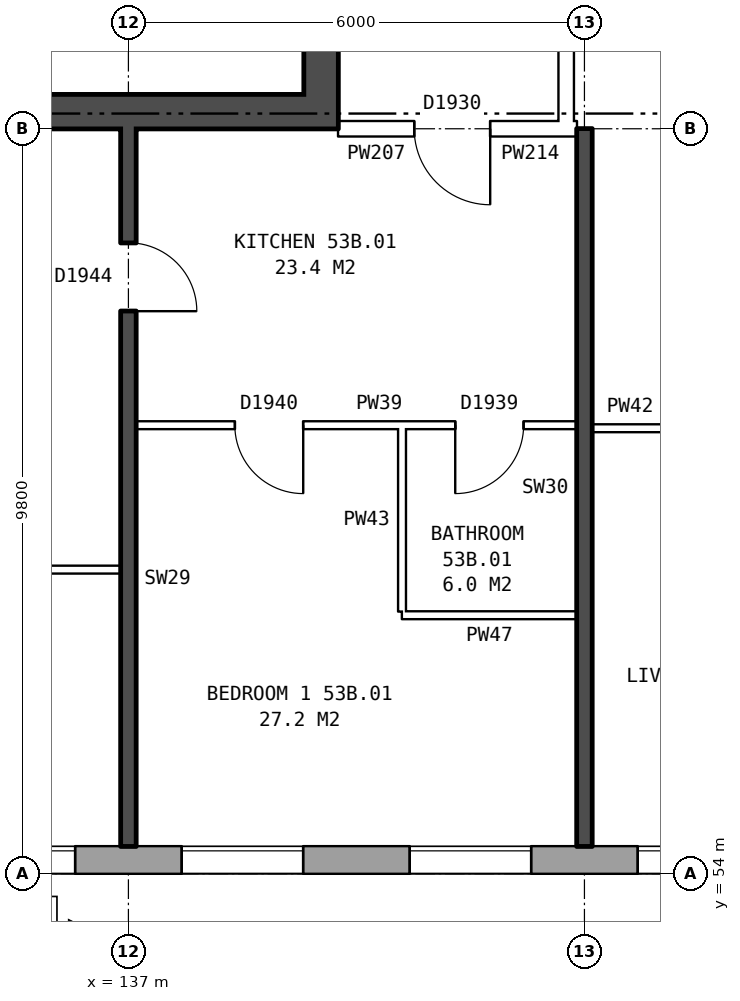
"""IFC4 building model, lengths in metres.
Left out: names, types, materials, properties, quantities, classifications, styles, units other than length and angle.
Written with IfcOpenShell. Run it as: python <this file> out.ifc"""

import sys

from ifc_helpers import new_model, si_unit, direction, frame, frame_2d, origin, place, context, subcontext, project, spatial, rectangle, extrude, element, fill, save


model = new_model("IFC4")
c1 = context("Model", 3, precision=1e-05, world=origin(), true_north=direction((0.0, 1.0)))
c2 = subcontext(c1, "Body", "Model", "MODEL_VIEW")
j1 = project(units=[si_unit("LENGTHUNIT", "METRE"), si_unit("PLANEANGLEUNIT", "RADIAN")], contexts=[c1])
p1 = place(None, origin())
s1 = spatial("IfcSite", under=j1, at=p1, CompositionType="ELEMENT")
p2 = place(p1, origin())
s2 = spatial("IfcBuilding", under=s1, at=p2, CompositionType="ELEMENT")
p3 = place(p2, frame((0.0, 0.0, 188.2)))
s3 = spatial("IfcBuildingStorey", under=s2, at=p3, CompositionType="ELEMENT", Elevation=188.2)
p4 = place(p3, frame((134.075, 54.18, 0.0), z_axis=(0.0, 0.0, 1.0), x_axis=(1.0, 0.0, 0.0)))
e1 = element("IfcWall", 1, at=p4, inside=s3, PredefinedType="STANDARD", context=c2, shape_type="SweptSolid", body=[
    extrude(rectangle(XDim=33.101, YDim=0.36, at=frame_2d((16.55, 0.0))), origin(), (0.0, 0.0, 1.0), 2.85),
])
p5 = place(p4, frame((0.625, 0.0, 0.8)))
e2 = element("IfcOpeningElement", 2, at=p5, cuts=e1, PredefinedType="OPENING", context=c2, shape_type="SweptSolid", body=[
    extrude(rectangle(XDim=1.6, YDim=1.8, at=frame_2d((0.8, 0.9))), frame((0.0, 0.19, 0.0), z_axis=(0.0, -1.0, 0.0), x_axis=(1.0, 0.0, 0.0)), (0.0, 0.0, 1.0), 0.38),
])
p6 = place(p4, frame((3.625, 0.0, 0.8)))
e3 = element("IfcOpeningElement", 3, at=p6, cuts=e1, PredefinedType="OPENING", context=c2, shape_type="SweptSolid", body=[
    extrude(rectangle(XDim=1.6, YDim=1.8, at=frame_2d((0.8, 0.9))), frame((0.0, 0.19, 0.0), z_axis=(0.0, -1.0, 0.0), x_axis=(1.0, 0.0, 0.0)), (0.0, 0.0, 1.0), 0.38),
])
p7 = place(p4, frame((6.625, 0.0, 0.8)))
e4 = element("IfcOpeningElement", 4, at=p7, cuts=e1, PredefinedType="OPENING", context=c2, shape_type="SweptSolid", body=[
    extrude(rectangle(XDim=1.6, YDim=1.8, at=frame_2d((0.8, 0.9))), frame((0.0, 0.19, 0.0), z_axis=(0.0, -1.0, 0.0), x_axis=(1.0, 0.0, 0.0)), (0.0, 0.0, 1.0), 0.38),
])
p8 = place(p4, frame((9.625, 0.0, 0.8)))
e5 = element("IfcOpeningElement", 5, at=p8, cuts=e1, PredefinedType="OPENING", context=c2, shape_type="SweptSolid", body=[
    extrude(rectangle(XDim=1.6, YDim=1.8, at=frame_2d((0.8, 0.9))), frame((0.0, 0.19, 0.0), z_axis=(0.0, -1.0, 0.0), x_axis=(1.0, 0.0, 0.0)), (0.0, 0.0, 1.0), 0.38),
])
p9 = place(p4, frame((12.975, 0.0, 0.15)))
e6 = element("IfcOpeningElement", 6, at=p9, cuts=e1, PredefinedType="OPENING", context=c2, shape_type="SweptSolid", body=[
    extrude(rectangle(XDim=0.6, YDim=0.9, at=frame_2d((0.3, 0.45))), frame((0.0, 0.19, 0.0), z_axis=(0.0, -1.0, 0.0), x_axis=(1.0, 0.0, 0.0)), (0.0, 0.0, 1.0), 0.38),
])
p10 = place(p4, frame((15.625, 0.0, 0.8)))
e7 = element("IfcOpeningElement", 7, at=p10, cuts=e1, PredefinedType="OPENING", context=c2, shape_type="SweptSolid", body=[
    extrude(rectangle(XDim=1.6, YDim=1.8, at=frame_2d((0.8, 0.9))), frame((0.0, 0.19, 0.0), z_axis=(0.0, -1.0, 0.0), x_axis=(1.0, 0.0, 0.0)), (0.0, 0.0, 1.0), 0.38),
])
p11 = place(p4, frame((18.075, 0.0, 0.45)))
e8 = element("IfcOpeningElement", 8, at=p11, cuts=e1, PredefinedType="OPENING", context=c2, shape_type="SweptSolid", body=[
    extrude(rectangle(XDim=1.0, YDim=1.8, at=frame_2d((0.5, 0.9))), frame((0.0, 0.19, 0.0), z_axis=(0.0, -1.0, 0.0), x_axis=(1.0, 0.0, 0.0)), (0.0, 0.0, 1.0), 0.38),
])
p12 = place(p4, frame((21.625, 0.0, 0.8)))
e9 = element("IfcOpeningElement", 9, at=p12, cuts=e1, PredefinedType="OPENING", context=c2, shape_type="SweptSolid", body=[
    extrude(rectangle(XDim=1.6, YDim=1.8, at=frame_2d((0.8, 0.9))), frame((0.0, 0.19, 0.0), z_axis=(0.0, -1.0, 0.0), x_axis=(1.0, 0.0, 0.0)), (0.0, 0.0, 1.0), 0.38),
])
p13 = place(p4, frame((24.625, 0.0, 0.8)))
e10 = element("IfcOpeningElement", 10, at=p13, cuts=e1, PredefinedType="OPENING", context=c2, shape_type="SweptSolid", body=[
    extrude(rectangle(XDim=1.6, YDim=1.8, at=frame_2d((0.8, 0.9))), frame((0.0, 0.19, 0.0), z_axis=(0.0, -1.0, 0.0), x_axis=(1.0, 0.0, 0.0)), (0.0, 0.0, 1.0), 0.38),
])
p14 = place(p4, frame((27.625, 0.0, 0.8)))
e11 = element("IfcOpeningElement", 11, at=p14, cuts=e1, PredefinedType="OPENING", context=c2, shape_type="SweptSolid", body=[
    extrude(rectangle(XDim=1.6, YDim=1.8, at=frame_2d((0.8, 0.9))), frame((0.0, 0.19, 0.0), z_axis=(0.0, -1.0, 0.0), x_axis=(1.0, 0.0, 0.0)), (0.0, 0.0, 1.0), 0.38),
])
p15 = place(p4, frame((30.625, 0.0, 0.8)))
e12 = element("IfcOpeningElement", 12, at=p15, cuts=e1, PredefinedType="OPENING", context=c2, shape_type="SweptSolid", body=[
    extrude(rectangle(XDim=1.6, YDim=1.8, at=frame_2d((0.8, 0.9))), frame((0.0, 0.19, 0.0), z_axis=(0.0, -1.0, 0.0), x_axis=(1.0, 0.0, 0.0)), (0.0, 0.0, 1.0), 0.38),
])
p16 = place(p4, frame((13.875, 0.0, 0.25)))
e13 = element("IfcOpeningElement", 13, at=p16, cuts=e1, PredefinedType="OPENING", context=c2, shape_type="SweptSolid", body=[
    extrude(rectangle(XDim=0.8, YDim=1.8, at=frame_2d((0.4, 0.9))), frame((0.0, 0.19, 0.0), z_axis=(0.0, -1.0, 0.0), x_axis=(1.0, 0.0, 0.0)), (0.0, 0.0, 1.0), 0.38),
])
p17 = place(p4, frame((19.375, 0.0, 0.35)))
e14 = element("IfcOpeningElement", 14, at=p17, cuts=e1, PredefinedType="OPENING", context=c2, shape_type="SweptSolid", body=[
    extrude(rectangle(XDim=0.6, YDim=0.9, at=frame_2d((0.3, 0.45))), frame((0.0, 0.19, 0.0), z_axis=(0.0, -1.0, 0.0), x_axis=(1.0, 0.0, 0.0)), (0.0, 0.0, 1.0), 0.38),
])
p18 = place(p3, frame((139.535, 63.8, 0.0), z_axis=(0.0, 0.0, 1.0), x_axis=(0.0, 1.0, 0.0)))
e15 = element("IfcWall", 15, at=p18, inside=s3, PredefinedType="SHEAR", context=c2, shape_type="SweptSolid", body=[
    extrude(rectangle(XDim=12.4, YDim=0.45, at=frame_2d((6.2, 0.0))), origin(), (0.0, 0.0, 1.0), 2.85),
])
p19 = place(p18, frame((1.325, 0.0, 0.0)))
e16 = element("IfcOpeningElement", 16, at=p19, cuts=e15, PredefinedType="OPENING", context=c2, shape_type="SweptSolid", body=[
    extrude(rectangle(XDim=1.1, YDim=2.1, at=frame_2d((0.55, 1.05))), frame((0.0, 0.235, 0.0), z_axis=(0.0, -1.0, 0.0), x_axis=(1.0, 0.0, 0.0)), (0.0, 0.0, 1.0), 0.47),
])
p20 = place(p18, frame((3.6, 0.0, 0.0)))
e17 = element("IfcOpeningElement", 17, at=p20, cuts=e15, PredefinedType="OPENING", context=c2, shape_type="SweptSolid", body=[
    extrude(rectangle(XDim=1.1, YDim=2.1, at=frame_2d((0.55, 1.05))), frame((0.0, 0.235, 0.0), z_axis=(0.0, -1.0, 0.0), x_axis=(1.0, 0.0, 0.0)), (0.0, 0.0, 1.0), 0.47),
])
p21 = place(p18, frame((5.8, 0.0, 0.0)))
e18 = element("IfcOpeningElement", 18, at=p21, cuts=e15, PredefinedType="OPENING", context=c2, shape_type="SweptSolid", body=[
    extrude(rectangle(XDim=1.1, YDim=2.1, at=frame_2d((0.55, 1.05))), frame((0.0, 0.235, 0.0), z_axis=(0.0, -1.0, 0.0), x_axis=(1.0, 0.0, 0.0)), (0.0, 0.0, 1.0), 0.47),
])
p22 = place(p18, frame((9.9, 0.0, 0.0)))
e19 = element("IfcOpeningElement", 19, at=p22, cuts=e15, PredefinedType="OPENING", context=c2, shape_type="SweptSolid", body=[
    extrude(rectangle(XDim=1.1, YDim=2.1, at=frame_2d((0.55, 1.05))), frame((0.0, 0.235, 0.0), z_axis=(0.0, -1.0, 0.0), x_axis=(1.0, 0.0, 0.0)), (0.0, 0.0, 1.0), 0.47),
])
p23 = place(p18, frame((8.125, 0.0, 0.0)))
e20 = element("IfcOpeningElement", 20, at=p23, cuts=e15, PredefinedType="OPENING", context=c2, shape_type="SweptSolid", body=[
    extrude(rectangle(XDim=0.85, YDim=2.1, at=frame_2d((0.425, 1.05))), frame((0.0, 0.235, 0.0), z_axis=(0.0, -1.0, 0.0), x_axis=(1.0, 0.0, 0.0)), (0.0, 0.0, 1.0), 0.47),
])
p24 = place(p3, frame((139.31, 64.025, 0.0), z_axis=(0.0, 0.0, 1.0), x_axis=(-1.0, 0.0, 0.0)))
e21 = element("IfcWall", 21, at=p24, inside=s3, PredefinedType="SHEAR", context=c2, shape_type="SweptSolid", body=[
    extrude(rectangle(XDim=7.5, YDim=0.45, at=frame_2d((3.75, 0.0))), origin(), (0.0, 0.0, 1.0), 2.85),
])
p25 = place(p3, frame((142.76, 63.9, 0.0), z_axis=(0.0, 0.0, 1.0), x_axis=(0.0, 1.0, 0.0)))
e22 = element("IfcWall", 22, at=p25, inside=s3, PredefinedType="PARTITIONING", context=c2, shape_type="SweptSolid", body=[
    extrude(rectangle(XDim=12.2, YDim=0.2, at=frame_2d((6.1, 0.0))), origin(), (0.0, 0.0, 1.0), 2.85),
])
p26 = place(p25, frame((5.1, 0.0, 0.0)))
e23 = element("IfcOpeningElement", 23, at=p26, cuts=e22, PredefinedType="OPENING", context=c2, shape_type="SweptSolid", body=[
    extrude(rectangle(XDim=2.0, YDim=2.1, at=frame_2d((1.0, 1.05))), frame((0.0, 0.11, 0.0), z_axis=(0.0, -1.0, 0.0), x_axis=(1.0, 0.0, 0.0)), (0.0, 0.0, 1.0), 0.22),
])
p27 = place(p3, frame((140.6, 57.4, 0.0), z_axis=(0.0, 0.0, 1.0), x_axis=(1.0, 0.0, 0.0)))
e24 = element("IfcWall", 24, at=p27, inside=s3, PredefinedType="PARTITIONING", context=c2, shape_type="SweptSolid", body=[
    extrude(rectangle(XDim=2.3, YDim=0.1, at=frame_2d((1.15, 0.0))), origin(), (0.0, 0.0, 1.0), 2.85),
])
p28 = place(p3, frame((131.36, 58.0, 0.0), z_axis=(0.0, 0.0, 1.0), x_axis=(1.0, 0.0, 0.0)))
e25 = element("IfcWall", 25, at=p28, inside=s3, PredefinedType="PARTITIONING", context=c2, shape_type="SweptSolid", body=[
    extrude(rectangle(XDim=5.54, YDim=0.1, at=frame_2d((2.77, 0.0))), origin(), (0.0, 0.0, 1.0), 2.85),
])
p29 = place(p28, frame((2.32, 0.0, 0.0)))
e26 = element("IfcOpeningElement", 26, at=p29, cuts=e25, PredefinedType="OPENING", context=c2, shape_type="SweptSolid", body=[
    extrude(rectangle(XDim=0.9, YDim=2.1, at=frame_2d((0.45, 1.05))), frame((0.0, 0.06, 0.0), z_axis=(0.0, -1.0, 0.0), x_axis=(1.0, 0.0, 0.0)), (0.0, 0.0, 1.0), 0.12),
])
p30 = place(p3, frame((143.1, 59.86, 0.0), z_axis=(0.0, 0.0, 1.0), x_axis=(1.0, 0.0, 0.0)))
e27 = element("IfcWall", 27, at=p30, inside=s3, PredefinedType="PARTITIONING", context=c2, shape_type="SweptSolid", body=[
    extrude(rectangle(XDim=2.9, YDim=0.1, at=frame_2d((1.45, 0.0))), origin(), (0.0, 0.0, 1.0), 2.85),
])
p31 = place(p30, frame((1.0, 0.0, 0.0)))
e28 = element("IfcOpeningElement", 28, at=p31, cuts=e27, PredefinedType="OPENING", context=c2, shape_type="SweptSolid", body=[
    extrude(rectangle(XDim=0.9, YDim=2.1, at=frame_2d((0.45, 1.05))), frame((0.0, 0.06, 0.0), z_axis=(0.0, -1.0, 0.0), x_axis=(1.0, 0.0, 0.0)), (0.0, 0.0, 1.0), 0.12),
])
p32 = place(p3, frame((137.1, 59.9, 0.0), z_axis=(0.0, 0.0, 1.0), x_axis=(1.0, 0.0, 0.0)))
e29 = element("IfcWall", 29, at=p32, inside=s3, PredefinedType="PARTITIONING", context=c2, shape_type="SweptSolid", body=[
    extrude(rectangle(XDim=5.8, YDim=0.1, at=frame_2d((2.9, 0.0))), origin(), (0.0, 0.0, 1.0), 2.85),
])
p33 = place(p32, frame((1.3, 0.0, 0.0)))
e30 = element("IfcOpeningElement", 30, at=p33, cuts=e29, PredefinedType="OPENING", context=c2, shape_type="SweptSolid", body=[
    extrude(rectangle(XDim=0.9, YDim=2.1, at=frame_2d((0.45, 1.05))), frame((0.0, 0.06, 0.0), z_axis=(0.0, -1.0, 0.0), x_axis=(1.0, 0.0, 0.0)), (0.0, 0.0, 1.0), 0.12),
])
p34 = place(p32, frame((4.2, 0.0, 0.0)))
e31 = element("IfcOpeningElement", 31, at=p34, cuts=e29, PredefinedType="OPENING", context=c2, shape_type="SweptSolid", body=[
    extrude(rectangle(XDim=0.9, YDim=2.1, at=frame_2d((0.45, 1.05))), frame((0.0, 0.06, 0.0), z_axis=(0.0, -1.0, 0.0), x_axis=(1.0, 0.0, 0.0)), (0.0, 0.0, 1.0), 0.12),
])
p35 = place(p3, frame((139.76, 63.8, 0.0), z_axis=(0.0, 0.0, 1.0), x_axis=(1.0, 0.0, 0.0)))
e32 = element("IfcWall", 32, at=p35, inside=s3, PredefinedType="PARTITIONING", context=c2, shape_type="SweptSolid", body=[
    extrude(rectangle(XDim=3.0, YDim=0.2, at=frame_2d((1.5, 0.0))), origin(), (0.0, 0.0, 1.0), 2.85),
])
p36 = place(p35, frame((1.0, 0.0, 0.0)))
e33 = element("IfcOpeningElement", 33, at=p36, cuts=e32, PredefinedType="OPENING", context=c2, shape_type="SweptSolid", body=[
    extrude(rectangle(XDim=1.0, YDim=2.1, at=frame_2d((0.5, 1.05))), frame((0.0, 0.11, 0.0), z_axis=(0.0, -1.0, 0.0), x_axis=(1.0, 0.0, 0.0)), (0.0, 0.0, 1.0), 0.22),
])
p37 = place(p3, frame((142.76, 63.8, 0.0), z_axis=(0.0, 0.0, 1.0), x_axis=(1.0, 0.0, 0.0)))
e34 = element("IfcWall", 34, at=p37, inside=s3, PredefinedType="PARTITIONING", context=c2, shape_type="SweptSolid", body=[
    extrude(rectangle(XDim=0.14, YDim=0.2, at=frame_2d((0.07, 0.0))), origin(), (0.0, 0.0, 1.0), 2.85),
])
p38 = place(p3, frame((137.0, 54.36, 0.0), z_axis=(0.0, 0.0, 1.0), x_axis=(0.0, 1.0, 0.0)))
e35 = element("IfcWall", 35, at=p38, inside=s3, PredefinedType="SOLIDWALL", context=c2, shape_type="SweptSolid", body=[
    extrude(rectangle(XDim=9.44, YDim=0.2, at=frame_2d((4.72, 0.0))), origin(), (0.0, 0.0, 1.0), 2.85),
])
p39 = place(p38, frame((7.04, 0.0, 0.0)))
e36 = element("IfcOpeningElement", 36, at=p39, cuts=e35, PredefinedType="OPENING", context=c2, shape_type="SweptSolid", body=[
    extrude(rectangle(XDim=0.9, YDim=2.1, at=frame_2d((0.45, 1.05))), frame((0.0, 0.11, 0.0), z_axis=(0.0, -1.0, 0.0), x_axis=(1.0, 0.0, 0.0)), (0.0, 0.0, 1.0), 0.22),
])
p40 = place(p3, frame((140.6, 57.45, 0.0), z_axis=(0.0, 0.0, 1.0), x_axis=(0.0, 1.0, 0.0)))
e37 = element("IfcWall", 37, at=p40, inside=s3, PredefinedType="PARTITIONING", context=c2, shape_type="SweptSolid", body=[
    extrude(rectangle(XDim=2.4, YDim=0.1, at=frame_2d((1.2, 0.0))), origin(), (0.0, 0.0, 1.0), 2.85),
])
p41 = place(p3, frame((143.0, 54.36, 0.0), z_axis=(0.0, 0.0, 1.0), x_axis=(0.0, 1.0, 0.0)))
e38 = element("IfcWall", 38, at=p41, inside=s3, PredefinedType="SOLIDWALL", context=c2, shape_type="SweptSolid", body=[
    extrude(rectangle(XDim=9.44, YDim=0.2, at=frame_2d((4.72, 0.0))), origin(), (0.0, 0.0, 1.0), 2.85),
])
p42 = place(p5, origin())
e39 = element("IfcWindow", 39, at=p42, inside=s3, PartitioningType="SINGLE_PANEL", PredefinedType="WINDOW", context=c2, shape_type="SweptSolid", body=[
    extrude(rectangle(XDim=1.6, YDim=1.8, at=frame_2d((0.8, 0.9))), frame((0.0, 0.15, 0.0), z_axis=(0.0, -1.0, 0.0), x_axis=(1.0, 0.0, 0.0)), (0.0, 0.0, 1.0), 0.06),
])
fill(e2, e39)
p43 = place(p6, origin())
e40 = element("IfcWindow", 40, at=p43, inside=s3, PartitioningType="SINGLE_PANEL", PredefinedType="WINDOW", context=c2, shape_type="SweptSolid", body=[
    extrude(rectangle(XDim=1.6, YDim=1.8, at=frame_2d((0.8, 0.9))), frame((0.0, 0.15, 0.0), z_axis=(0.0, -1.0, 0.0), x_axis=(1.0, 0.0, 0.0)), (0.0, 0.0, 1.0), 0.06),
])
fill(e3, e40)
p44 = place(p7, origin())
e41 = element("IfcWindow", 41, at=p44, inside=s3, PartitioningType="SINGLE_PANEL", PredefinedType="WINDOW", context=c2, shape_type="SweptSolid", body=[
    extrude(rectangle(XDim=1.6, YDim=1.8, at=frame_2d((0.8, 0.9))), frame((0.0, 0.15, 0.0), z_axis=(0.0, -1.0, 0.0), x_axis=(1.0, 0.0, 0.0)), (0.0, 0.0, 1.0), 0.06),
])
fill(e4, e41)
p45 = place(p8, origin())
e42 = element("IfcWindow", 42, at=p45, inside=s3, PartitioningType="SINGLE_PANEL", PredefinedType="WINDOW", context=c2, shape_type="SweptSolid", body=[
    extrude(rectangle(XDim=1.6, YDim=1.8, at=frame_2d((0.8, 0.9))), frame((0.0, 0.15, 0.0), z_axis=(0.0, -1.0, 0.0), x_axis=(1.0, 0.0, 0.0)), (0.0, 0.0, 1.0), 0.06),
])
fill(e5, e42)
p46 = place(p33, frame((0.9, 0.0, 0.0), z_axis=(0.0, 0.0, 1.0), x_axis=(-1.0, 0.0, 0.0)))
e43 = element("IfcDoor", 43, at=p46, inside=s3, OperationType="SINGLE_SWING_LEFT", PredefinedType="DOOR", context=c2, shape_type="SweptSolid", body=[
    extrude(rectangle(XDim=0.9, YDim=2.1, at=frame_2d((0.45, 1.05))), frame((0.0, 0.025, 0.0), z_axis=(0.0, -1.0, 0.0), x_axis=(1.0, 0.0, 0.0)), (0.0, 0.0, 1.0), 0.05),
])
fill(e30, e43)
p47 = place(p36, frame((1.0, 0.0, 0.0), z_axis=(0.0, 0.0, 1.0), x_axis=(-1.0, 0.0, 0.0)))
e44 = element("IfcDoor", 44, at=p47, inside=s3, OperationType="SINGLE_SWING_LEFT", PredefinedType="DOOR", context=c2, shape_type="SweptSolid", body=[
    extrude(rectangle(XDim=1.0, YDim=2.1, at=frame_2d((0.5, 1.05))), frame((0.0, 0.025, 0.0), z_axis=(0.0, -1.0, 0.0), x_axis=(1.0, 0.0, 0.0)), (0.0, 0.0, 1.0), 0.05),
])
fill(e33, e44)
p48 = place(p39, frame((0.9, 0.0, 0.0), z_axis=(0.0, 0.0, 1.0), x_axis=(-1.0, 0.0, 0.0)))
e45 = element("IfcDoor", 45, at=p48, inside=s3, OperationType="SINGLE_SWING_RIGHT", PredefinedType="DOOR", context=c2, shape_type="SweptSolid", body=[
    extrude(rectangle(XDim=0.9, YDim=2.1, at=frame_2d((0.45, 1.05))), frame((0.0, 0.025, 0.0), z_axis=(0.0, -1.0, 0.0), x_axis=(1.0, 0.0, 0.0)), (0.0, 0.0, 1.0), 0.05),
])
fill(e36, e45)
p49 = place(p34, frame((0.9, 0.0, 0.0), z_axis=(0.0, 0.0, 1.0), x_axis=(-1.0, 0.0, 0.0)))
e46 = element("IfcDoor", 46, at=p49, inside=s3, OperationType="SINGLE_SWING_RIGHT", PredefinedType="DOOR", context=c2, shape_type="SweptSolid", body=[
    extrude(rectangle(XDim=0.9, YDim=2.1, at=frame_2d((0.45, 1.05))), frame((0.0, 0.025, 0.0), z_axis=(0.0, -1.0, 0.0), x_axis=(1.0, 0.0, 0.0)), (0.0, 0.0, 1.0), 0.05),
])
fill(e31, e46)
save(model, sys.argv[1])
